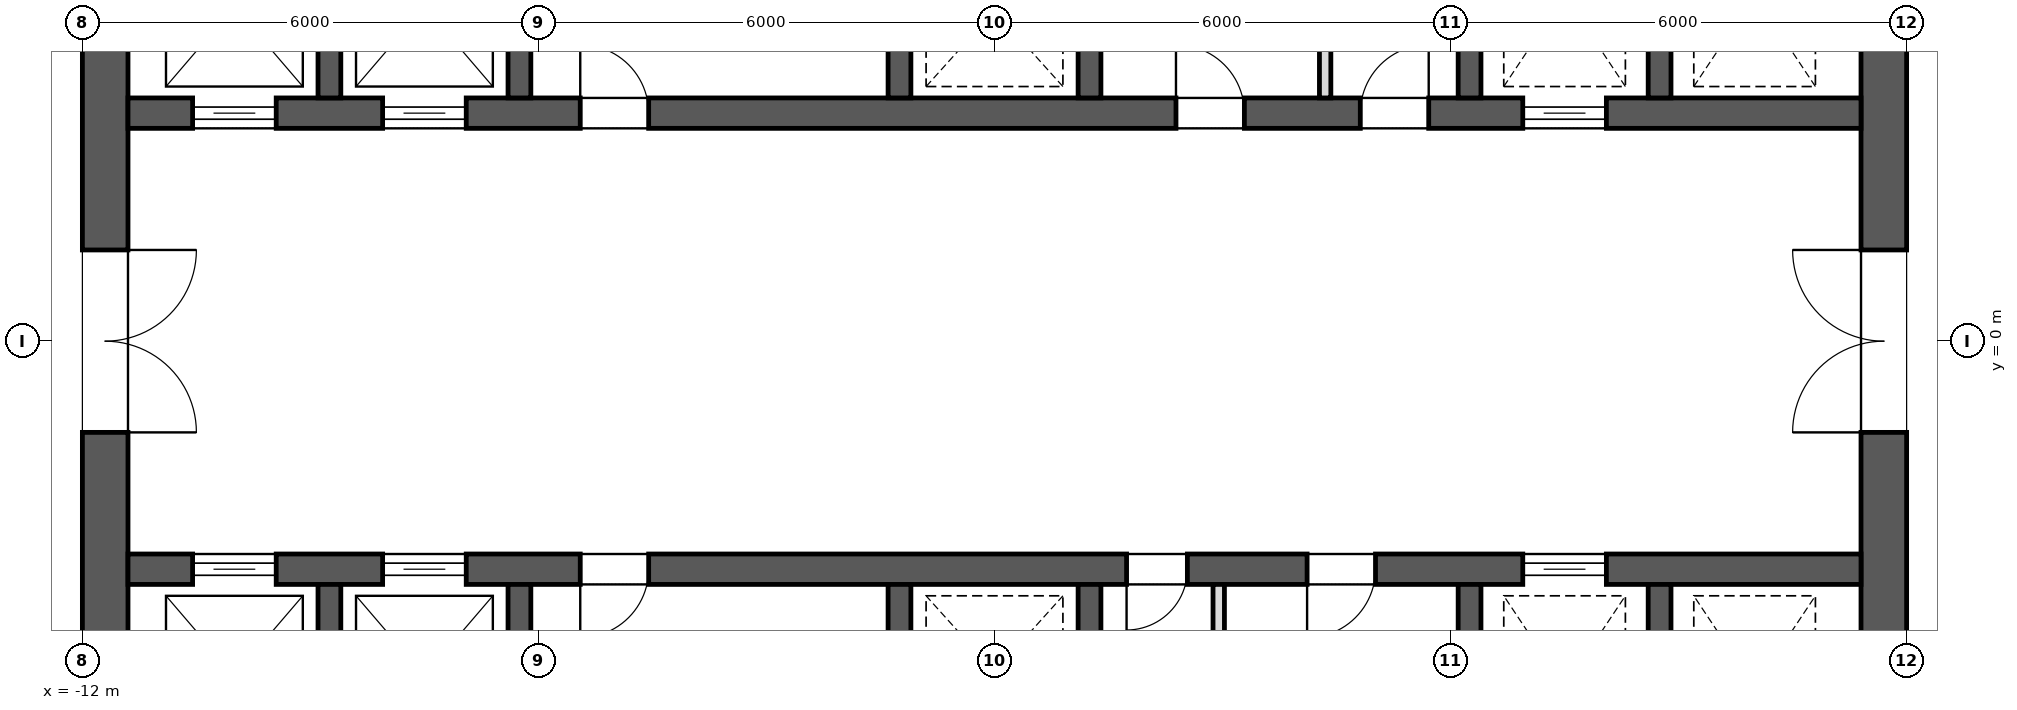
"""IFC4 building model, lengths in metres.
Left out: names, types, materials, properties, quantities, classifications, styles, units other than length and angle.
Written with IfcOpenShell. Run it as: python <this file> out.ifc"""

import sys

from ifc_helpers import new_model, si_unit, direction, frame, frame_2d, origin, place, context, subcontext, project, spatial, rectangle, extrude, element, fill, save


model = new_model("IFC4")
c1 = context("Model", 3, precision=1e-05, world=origin(), true_north=direction((0.0, 1.0)))
c2 = subcontext(c1, "Body", "Model", "MODEL_VIEW")
j1 = project(units=[si_unit("LENGTHUNIT", "METRE"), si_unit("PLANEANGLEUNIT", "RADIAN")], contexts=[c1])
p1 = place(None, origin())
s1 = spatial("IfcSite", under=j1, at=p1, CompositionType="ELEMENT")
p2 = place(p1, origin())
s2 = spatial("IfcBuilding", under=s1, at=p2, CompositionType="ELEMENT")
p3 = place(p2, frame((0.0, 0.0, 288.3)))
s3 = spatial("IfcBuildingStorey", under=s2, at=p3, CompositionType="ELEMENT", Elevation=288.3)
p4 = place(p3, frame((11.7, -11.4, 0.0), z_axis=(0.0, 0.0, 1.0), x_axis=(0.0, 1.0, 0.0)))
e1 = element("IfcWall", 1, at=p4, inside=s3, PredefinedType="SHEAR", context=c2, shape_type="SweptSolid", body=[
    extrude(rectangle(XDim=22.8, YDim=0.6, at=frame_2d((11.4, 0.0))), origin(), (0.0, 0.0, 1.0), 4.0),
])
p5 = place(p4, frame((10.2, 0.0, 0.0)))
e2 = element("IfcOpeningElement", 2, at=p5, cuts=e1, PredefinedType="OPENING", context=c2, shape_type="SweptSolid", body=[
    extrude(rectangle(XDim=2.4, YDim=2.1, at=frame_2d((1.2, 1.05))), frame((0.0, 0.312, 0.0), z_axis=(0.0, -1.0, 0.0), x_axis=(1.0, 0.0, 0.0)), (0.0, 0.0, 1.0), 0.624),
])
p6 = place(p4, frame((19.5, 0.0, 0.0)))
e3 = element("IfcOpeningElement", 3, at=p6, cuts=e1, PredefinedType="OPENING", context=c2, shape_type="SweptSolid", body=[
    extrude(rectangle(XDim=1.2, YDim=2.1, at=frame_2d((0.6, 1.05))), frame((0.0, 0.312, 0.0), z_axis=(0.0, -1.0, 0.0), x_axis=(1.0, 0.0, 0.0)), (0.0, 0.0, 1.0), 0.624),
])
p7 = place(p4, frame((2.1, 0.0, 0.0)))
e4 = element("IfcOpeningElement", 4, at=p7, cuts=e1, PredefinedType="OPENING", context=c2, shape_type="SweptSolid", body=[
    extrude(rectangle(XDim=1.2, YDim=2.1, at=frame_2d((0.6, 1.05))), frame((0.0, 0.312, 0.0), z_axis=(0.0, -1.0, 0.0), x_axis=(1.0, 0.0, 0.0)), (0.0, 0.0, 1.0), 0.624),
])
p8 = place(p3, frame((-11.7, -11.4, 0.0), z_axis=(0.0, 0.0, 1.0), x_axis=(0.0, 1.0, 0.0)))
e5 = element("IfcWall", 5, at=p8, inside=s3, PredefinedType="SHEAR", context=c2, shape_type="SweptSolid", body=[
    extrude(rectangle(XDim=22.8, YDim=0.6, at=frame_2d((11.4, 0.0))), origin(), (0.0, 0.0, 1.0), 4.0),
])
p9 = place(p8, frame((10.2, 0.0, 0.0)))
e6 = element("IfcOpeningElement", 6, at=p9, cuts=e5, PredefinedType="OPENING", context=c2, shape_type="SweptSolid", body=[
    extrude(rectangle(XDim=2.4, YDim=2.1, at=frame_2d((1.2, 1.05))), frame((0.0, 0.312, 0.0), z_axis=(0.0, -1.0, 0.0), x_axis=(1.0, 0.0, 0.0)), (0.0, 0.0, 1.0), 0.624),
])
p10 = place(p8, frame((18.925, 0.0, 0.0)))
e7 = element("IfcOpeningElement", 7, at=p10, cuts=e5, PredefinedType="OPENING", context=c2, shape_type="SweptSolid", body=[
    extrude(rectangle(XDim=1.2, YDim=2.1, at=frame_2d((0.6, 1.05))), frame((0.0, 0.312, 0.0), z_axis=(0.0, -1.0, 0.0), x_axis=(1.0, 0.0, 0.0)), (0.0, 0.0, 1.0), 0.624),
])
p11 = place(p8, frame((2.675, 0.0, 0.0)))
e8 = element("IfcOpeningElement", 8, at=p11, cuts=e5, PredefinedType="OPENING", context=c2, shape_type="SweptSolid", body=[
    extrude(rectangle(XDim=1.2, YDim=2.1, at=frame_2d((0.6, 1.05))), frame((0.0, 0.312, 0.0), z_axis=(0.0, -1.0, 0.0), x_axis=(1.0, 0.0, 0.0)), (0.0, 0.0, 1.0), 0.624),
])
p12 = place(p3, frame((-11.4, 3.0, 0.0), z_axis=(0.0, 0.0, 1.0), x_axis=(1.0, 0.0, 0.0)))
e9 = element("IfcWall", 9, at=p12, inside=s3, PredefinedType="SHEAR", context=c2, shape_type="SweptSolid", body=[
    extrude(rectangle(XDim=22.8, YDim=0.4, at=frame_2d((11.4, 0.0))), origin(), (0.0, 0.0, 1.0), 4.0),
])
p13 = place(p12, frame((0.85, 0.0, 0.0)))
e10 = element("IfcOpeningElement", 10, at=p13, cuts=e9, PredefinedType="OPENING", context=c2, shape_type="SweptSolid", body=[
    extrude(rectangle(XDim=1.1, YDim=2.1, at=frame_2d((0.55, 1.05))), frame((0.0, 0.212, 0.0), z_axis=(0.0, -1.0, 0.0), x_axis=(1.0, 0.0, 0.0)), (0.0, 0.0, 1.0), 0.424),
])
p14 = place(p12, frame((3.35, 0.0, 0.0)))
e11 = element("IfcOpeningElement", 11, at=p14, cuts=e9, PredefinedType="OPENING", context=c2, shape_type="SweptSolid", body=[
    extrude(rectangle(XDim=1.1, YDim=2.1, at=frame_2d((0.55, 1.05))), frame((0.0, 0.212, 0.0), z_axis=(0.0, -1.0, 0.0), x_axis=(1.0, 0.0, 0.0)), (0.0, 0.0, 1.0), 0.424),
])
p15 = place(p12, frame((18.35, 0.0, 0.0)))
e12 = element("IfcOpeningElement", 12, at=p15, cuts=e9, PredefinedType="OPENING", context=c2, shape_type="SweptSolid", body=[
    extrude(rectangle(XDim=1.1, YDim=2.1, at=frame_2d((0.55, 1.05))), frame((0.0, 0.212, 0.0), z_axis=(0.0, -1.0, 0.0), x_axis=(1.0, 0.0, 0.0)), (0.0, 0.0, 1.0), 0.424),
])
p16 = place(p12, frame((13.788, 0.0, 0.0)))
e13 = element("IfcOpeningElement", 13, at=p16, cuts=e9, PredefinedType="OPENING", context=c2, shape_type="SweptSolid", body=[
    extrude(rectangle(XDim=0.9, YDim=2.1, at=frame_2d((0.45, 1.05))), frame((0.0, 0.212, 0.0), z_axis=(0.0, -1.0, 0.0), x_axis=(1.0, 0.0, 0.0)), (0.0, 0.0, 1.0), 0.424),
])
p17 = place(p12, frame((16.212, 0.0, 0.0)))
e14 = element("IfcOpeningElement", 14, at=p17, cuts=e9, PredefinedType="OPENING", context=c2, shape_type="SweptSolid", body=[
    extrude(rectangle(XDim=0.9, YDim=2.1, at=frame_2d((0.45, 1.05))), frame((0.0, 0.212, 0.0), z_axis=(0.0, -1.0, 0.0), x_axis=(1.0, 0.0, 0.0)), (0.0, 0.0, 1.0), 0.424),
])
p18 = place(p12, frame((5.95, 0.0, 0.0)))
e15 = element("IfcOpeningElement", 15, at=p18, cuts=e9, PredefinedType="OPENING", context=c2, shape_type="SweptSolid", body=[
    extrude(rectangle(XDim=0.9, YDim=2.1, at=frame_2d((0.45, 1.05))), frame((0.0, 0.212, 0.0), z_axis=(0.0, -1.0, 0.0), x_axis=(1.0, 0.0, 0.0)), (0.0, 0.0, 1.0), 0.424),
])
for number, where, z_axis, x_axis in (
    (16, (-8.75, 3.2, 0.0), (0.0, 0.0, 1.0), (0.0, 1.0, 0.0)),
    (17, (-6.25, 3.2, 0.0), (0.0, 0.0, 1.0), (0.0, 1.0, 0.0)),
    (18, (-1.25, 3.2, 0.0), (0.0, 0.0, 1.0), (0.0, 1.0, 0.0)),
    (19, (1.25, 3.2, 0.0), (0.0, 0.0, 1.0), (0.0, 1.0, 0.0)),
    (20, (6.25, 3.2, 0.0), (0.0, 0.0, 1.0), (0.0, 1.0, 0.0)),
    (21, (8.75, 3.2, 0.0), (0.0, 0.0, 1.0), (0.0, 1.0, 0.0)),
):
    element("IfcWall", number, at=place(p3, frame(where, z_axis=z_axis, x_axis=x_axis)), inside=s3, PredefinedType="SHEAR", context=c2, shape_type="SweptSolid", body=[
        extrude(rectangle(XDim=2.9, YDim=0.3, at=frame_2d((1.45, 0.0))), origin(), (0.0, 0.0, 1.0), 4.0),
    ])
p19 = place(p3, frame((-11.4, -3.0, 0.0), z_axis=(0.0, 0.0, 1.0), x_axis=(1.0, 0.0, 0.0)))
e22 = element("IfcWall", 22, at=p19, inside=s3, PredefinedType="SHEAR", context=c2, shape_type="SweptSolid", body=[
    extrude(rectangle(XDim=22.8, YDim=0.4, at=frame_2d((11.4, 0.0))), origin(), (0.0, 0.0, 1.0), 4.0),
])
p20 = place(p19, frame((0.85, 0.0, 0.0)))
e23 = element("IfcOpeningElement", 23, at=p20, cuts=e22, PredefinedType="OPENING", context=c2, shape_type="SweptSolid", body=[
    extrude(rectangle(XDim=1.1, YDim=2.1, at=frame_2d((0.55, 1.05))), frame((0.0, 0.212, 0.0), z_axis=(0.0, -1.0, 0.0), x_axis=(1.0, 0.0, 0.0)), (0.0, 0.0, 1.0), 0.424),
])
p21 = place(p19, frame((3.35, 0.0, 0.0)))
e24 = element("IfcOpeningElement", 24, at=p21, cuts=e22, PredefinedType="OPENING", context=c2, shape_type="SweptSolid", body=[
    extrude(rectangle(XDim=1.1, YDim=2.1, at=frame_2d((0.55, 1.05))), frame((0.0, 0.212, 0.0), z_axis=(0.0, -1.0, 0.0), x_axis=(1.0, 0.0, 0.0)), (0.0, 0.0, 1.0), 0.424),
])
p22 = place(p19, frame((18.35, 0.0, 0.0)))
e25 = element("IfcOpeningElement", 25, at=p22, cuts=e22, PredefinedType="OPENING", context=c2, shape_type="SweptSolid", body=[
    extrude(rectangle(XDim=1.1, YDim=2.1, at=frame_2d((0.55, 1.05))), frame((0.0, 0.212, 0.0), z_axis=(0.0, -1.0, 0.0), x_axis=(1.0, 0.0, 0.0)), (0.0, 0.0, 1.0), 0.424),
])
p23 = place(p19, frame((13.137, 0.0, 0.0)))
e26 = element("IfcOpeningElement", 26, at=p23, cuts=e22, PredefinedType="OPENING", context=c2, shape_type="SweptSolid", body=[
    extrude(rectangle(XDim=0.8, YDim=2.1, at=frame_2d((0.4, 1.05))), frame((0.0, 0.212, 0.0), z_axis=(0.0, -1.0, 0.0), x_axis=(1.0, 0.0, 0.0)), (0.0, 0.0, 1.0), 0.424),
])
p24 = place(p19, frame((15.512, 0.0, 0.0)))
e27 = element("IfcOpeningElement", 27, at=p24, cuts=e22, PredefinedType="OPENING", context=c2, shape_type="SweptSolid", body=[
    extrude(rectangle(XDim=0.9, YDim=2.1, at=frame_2d((0.45, 1.05))), frame((0.0, 0.212, 0.0), z_axis=(0.0, -1.0, 0.0), x_axis=(1.0, 0.0, 0.0)), (0.0, 0.0, 1.0), 0.424),
])
p25 = place(p19, frame((5.95, 0.0, 0.0)))
e28 = element("IfcOpeningElement", 28, at=p25, cuts=e22, PredefinedType="OPENING", context=c2, shape_type="SweptSolid", body=[
    extrude(rectangle(XDim=0.9, YDim=2.1, at=frame_2d((0.45, 1.05))), frame((0.0, 0.212, 0.0), z_axis=(0.0, -1.0, 0.0), x_axis=(1.0, 0.0, 0.0)), (0.0, 0.0, 1.0), 0.424),
])
for number, where, z_axis, x_axis in (
    (29, (-8.75, -6.1, 0.0), (0.0, 0.0, 1.0), (0.0, 1.0, 0.0)),
    (30, (-6.25, -6.1, 0.0), (0.0, 0.0, 1.0), (0.0, 1.0, 0.0)),
    (31, (-1.25, -6.1, 0.0), (0.0, 0.0, 1.0), (0.0, 1.0, 0.0)),
    (32, (1.25, -6.1, 0.0), (0.0, 0.0, 1.0), (0.0, 1.0, 0.0)),
    (33, (6.25, -6.1, 0.0), (0.0, 0.0, 1.0), (0.0, 1.0, 0.0)),
    (34, (8.75, -6.1, 0.0), (0.0, 0.0, 1.0), (0.0, 1.0, 0.0)),
):
    element("IfcWall", number, at=place(p3, frame(where, z_axis=z_axis, x_axis=x_axis)), inside=s3, PredefinedType="SHEAR", context=c2, shape_type="SweptSolid", body=[
        extrude(rectangle(XDim=2.9, YDim=0.3, at=frame_2d((1.45, 0.0))), origin(), (0.0, 0.0, 1.0), 4.0),
    ])
for number, where, z_axis, x_axis in (
    (35, (4.35, 3.2, 0.0), (0.0, 0.0, 1.0), (0.0, 1.0, 0.0)),
    (36, (2.95, -6.1, 0.0), (0.0, 0.0, 1.0), (0.0, 1.0, 0.0)),
):
    element("IfcWall", number, at=place(p3, frame(where, z_axis=z_axis, x_axis=x_axis)), inside=s3, PredefinedType="PARTITIONING", context=c2, shape_type="SweptSolid", body=[
        extrude(rectangle(XDim=2.9, YDim=0.15, at=frame_2d((1.45, 0.0))), origin(), (0.0, 0.0, 1.0), 3.7),
    ])
p26 = place(p13, origin())
e37 = element("IfcDoor", 37, at=p26, inside=s3, OperationType="SLIDING_TO_LEFT", PredefinedType="DOOR", context=c2, shape_type="SweptSolid", body=[
    extrude(rectangle(XDim=1.1, YDim=2.1, at=frame_2d((0.55, 1.05))), frame((0.0, 0.025, 0.0), z_axis=(0.0, -1.0, 0.0), x_axis=(1.0, 0.0, 0.0)), (0.0, 0.0, 1.0), 0.05),
])
fill(e10, e37)
p27 = place(p14, origin())
e38 = element("IfcDoor", 38, at=p27, inside=s3, OperationType="SLIDING_TO_LEFT", PredefinedType="DOOR", context=c2, shape_type="SweptSolid", body=[
    extrude(rectangle(XDim=1.1, YDim=2.1, at=frame_2d((0.55, 1.05))), frame((0.0, 0.025, 0.0), z_axis=(0.0, -1.0, 0.0), x_axis=(1.0, 0.0, 0.0)), (0.0, 0.0, 1.0), 0.05),
])
fill(e11, e38)
p28 = place(p20, origin())
e39 = element("IfcDoor", 39, at=p28, inside=s3, OperationType="SLIDING_TO_LEFT", PredefinedType="DOOR", context=c2, shape_type="SweptSolid", body=[
    extrude(rectangle(XDim=1.1, YDim=2.1, at=frame_2d((0.55, 1.05))), frame((0.0, 0.025, 0.0), z_axis=(0.0, -1.0, 0.0), x_axis=(1.0, 0.0, 0.0)), (0.0, 0.0, 1.0), 0.05),
])
fill(e23, e39)
p29 = place(p21, origin())
e40 = element("IfcDoor", 40, at=p29, inside=s3, OperationType="SLIDING_TO_LEFT", PredefinedType="DOOR", context=c2, shape_type="SweptSolid", body=[
    extrude(rectangle(XDim=1.1, YDim=2.1, at=frame_2d((0.55, 1.05))), frame((0.0, 0.025, 0.0), z_axis=(0.0, -1.0, 0.0), x_axis=(1.0, 0.0, 0.0)), (0.0, 0.0, 1.0), 0.05),
])
fill(e24, e40)
p30 = place(p15, origin())
e41 = element("IfcDoor", 41, at=p30, inside=s3, OperationType="SLIDING_TO_LEFT", PredefinedType="DOOR", context=c2, shape_type="SweptSolid", body=[
    extrude(rectangle(XDim=1.1, YDim=2.1, at=frame_2d((0.55, 1.05))), frame((0.0, 0.025, 0.0), z_axis=(0.0, -1.0, 0.0), x_axis=(1.0, 0.0, 0.0)), (0.0, 0.0, 1.0), 0.05),
])
fill(e12, e41)
p31 = place(p22, origin())
e42 = element("IfcDoor", 42, at=p31, inside=s3, OperationType="SLIDING_TO_LEFT", PredefinedType="DOOR", context=c2, shape_type="SweptSolid", body=[
    extrude(rectangle(XDim=1.1, YDim=2.1, at=frame_2d((0.55, 1.05))), frame((0.0, 0.025, 0.0), z_axis=(0.0, -1.0, 0.0), x_axis=(1.0, 0.0, 0.0)), (0.0, 0.0, 1.0), 0.05),
])
fill(e25, e42)
p32 = place(p9, frame((2.4, 0.0, 0.0), z_axis=(0.0, 0.0, 1.0), x_axis=(-1.0, 0.0, 0.0)))
e43 = element("IfcDoor", 43, at=p32, inside=s3, OperationType="DOUBLE_DOOR_SINGLE_SWING", PredefinedType="DOOR", context=c2, shape_type="SweptSolid", body=[
    extrude(rectangle(XDim=2.4, YDim=2.1, at=frame_2d((1.2, 1.05))), frame((0.0, 0.025, 0.0), z_axis=(0.0, -1.0, 0.0), x_axis=(1.0, 0.0, 0.0)), (0.0, 0.0, 1.0), 0.05),
])
fill(e6, e43)
p33 = place(p5, origin())
e44 = element("IfcDoor", 44, at=p33, inside=s3, OperationType="DOUBLE_DOOR_SINGLE_SWING", PredefinedType="DOOR", context=c2, shape_type="SweptSolid", body=[
    extrude(rectangle(XDim=2.4, YDim=2.1, at=frame_2d((1.2, 1.05))), frame((0.0, 0.025, 0.0), z_axis=(0.0, -1.0, 0.0), x_axis=(1.0, 0.0, 0.0)), (0.0, 0.0, 1.0), 0.05),
])
fill(e2, e44)
p34 = place(p16, origin())
e45 = element("IfcDoor", 45, at=p34, inside=s3, OperationType="SINGLE_SWING_RIGHT", PredefinedType="DOOR", context=c2, shape_type="SweptSolid", body=[
    extrude(rectangle(XDim=0.9, YDim=2.1, at=frame_2d((0.45, 1.05))), frame((0.0, 0.025, 0.0), z_axis=(0.0, -1.0, 0.0), x_axis=(1.0, 0.0, 0.0)), (0.0, 0.0, 1.0), 0.05),
])
fill(e13, e45)
p35 = place(p17, origin())
e46 = element("IfcDoor", 46, at=p35, inside=s3, OperationType="SINGLE_SWING_LEFT", PredefinedType="DOOR", context=c2, shape_type="SweptSolid", body=[
    extrude(rectangle(XDim=0.9, YDim=2.1, at=frame_2d((0.45, 1.05))), frame((0.0, 0.025, 0.0), z_axis=(0.0, -1.0, 0.0), x_axis=(1.0, 0.0, 0.0)), (0.0, 0.0, 1.0), 0.05),
])
fill(e14, e46)
p36 = place(p18, origin())
e47 = element("IfcDoor", 47, at=p36, inside=s3, OperationType="SINGLE_SWING_RIGHT", PredefinedType="DOOR", context=c2, shape_type="SweptSolid", body=[
    extrude(rectangle(XDim=0.9, YDim=2.1, at=frame_2d((0.45, 1.05))), frame((0.0, 0.025, 0.0), z_axis=(0.0, -1.0, 0.0), x_axis=(1.0, 0.0, 0.0)), (0.0, 0.0, 1.0), 0.05),
])
fill(e15, e47)
p37 = place(p23, frame((0.8, 0.0, 0.0), z_axis=(0.0, 0.0, 1.0), x_axis=(-1.0, 0.0, 0.0)))
e48 = element("IfcDoor", 48, at=p37, inside=s3, OperationType="SINGLE_SWING_LEFT", PredefinedType="DOOR", context=c2, shape_type="SweptSolid", body=[
    extrude(rectangle(XDim=0.8, YDim=2.1, at=frame_2d((0.4, 1.05))), frame((0.0, 0.025, 0.0), z_axis=(0.0, -1.0, 0.0), x_axis=(1.0, 0.0, 0.0)), (0.0, 0.0, 1.0), 0.05),
])
fill(e26, e48)
p38 = place(p24, frame((0.9, 0.0, 0.0), z_axis=(0.0, 0.0, 1.0), x_axis=(-1.0, 0.0, 0.0)))
e49 = element("IfcDoor", 49, at=p38, inside=s3, OperationType="SINGLE_SWING_LEFT", PredefinedType="DOOR", context=c2, shape_type="SweptSolid", body=[
    extrude(rectangle(XDim=0.9, YDim=2.1, at=frame_2d((0.45, 1.05))), frame((0.0, 0.025, 0.0), z_axis=(0.0, -1.0, 0.0), x_axis=(1.0, 0.0, 0.0)), (0.0, 0.0, 1.0), 0.05),
])
fill(e27, e49)
p39 = place(p25, frame((0.9, 0.0, 0.0), z_axis=(0.0, 0.0, 1.0), x_axis=(-1.0, 0.0, 0.0)))
e50 = element("IfcDoor", 50, at=p39, inside=s3, OperationType="SINGLE_SWING_LEFT", PredefinedType="DOOR", context=c2, shape_type="SweptSolid", body=[
    extrude(rectangle(XDim=0.9, YDim=2.1, at=frame_2d((0.45, 1.05))), frame((0.0, 0.025, 0.0), z_axis=(0.0, -1.0, 0.0), x_axis=(1.0, 0.0, 0.0)), (0.0, 0.0, 1.0), 0.05),
])
fill(e28, e50)
save(model, sys.argv[1])
